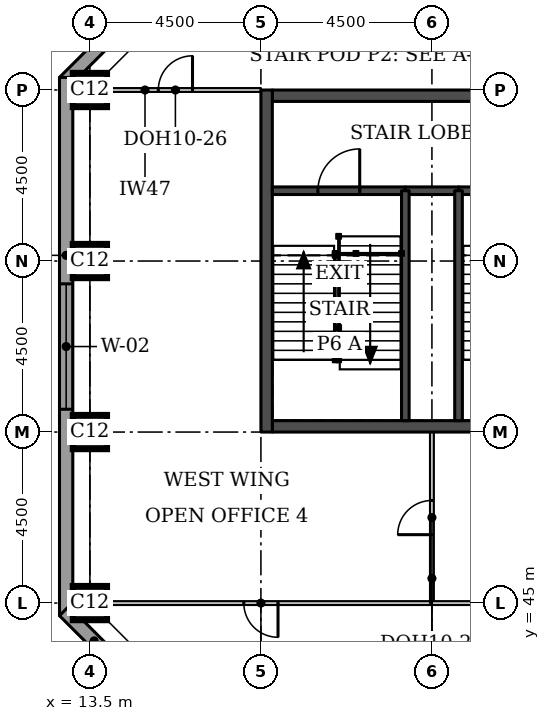
"""IFC4 building model, lengths in metres.
Left out: names, types, materials, properties, quantities, classifications, styles, units other than length and angle.
Written with IfcOpenShell. Run it as: python <this file> out.ifc"""

import sys

from ifc_helpers import new_model, si_unit, direction, frame, frame_2d, origin, origin_2d, place, context, subcontext, project, spatial, rectangle, extrude, element, fill, save


model = new_model("IFC4")
c1 = context("Model", 3, precision=1e-05, world=origin(), true_north=direction((0.0, 1.0)))
c2 = subcontext(c1, "Body", "Model", "MODEL_VIEW")
j1 = project(units=[si_unit("LENGTHUNIT", "METRE"), si_unit("PLANEANGLEUNIT", "RADIAN")], contexts=[c1])
p1 = place(None, origin())
s1 = spatial("IfcSite", under=j1, at=p1, CompositionType="ELEMENT")
p2 = place(p1, origin())
s2 = spatial("IfcBuilding", under=s1, at=p2, CompositionType="ELEMENT")
p3 = place(p2, frame((0.0, 0.0, 223.0)))
s3 = spatial("IfcBuildingStorey", under=s2, at=p3, CompositionType="ELEMENT", Elevation=223.0)
for number, where, z_axis, x_axis in (
    (1, (13.5, 45.0, 0.0), (0.0, 0.0, 1.0), (1.0, 0.0, 0.0)),
    (2, (13.5, 49.5, 0.0), (0.0, 0.0, 1.0), (1.0, 0.0, 0.0)),
    (3, (13.5, 54.0, 0.0), (0.0, 0.0, 1.0), (1.0, 0.0, 0.0)),
    (4, (13.5, 58.5, 0.0), (0.0, 0.0, 1.0), (1.0, 0.0, 0.0)),
):
    element("IfcColumn", number, at=place(p3, frame(where, z_axis=z_axis, x_axis=x_axis)), inside=s3, PredefinedType="COLUMN", context=c2, shape_type="SweptSolid", body=[
        extrude(rectangle(XDim=0.9, YDim=0.9, at=origin_2d()), origin(), (0.0, 0.0, 1.0), 3.7),
    ])
for number, where, z_axis, x_axis in (
    (5, (18.3, 49.65, 0.0), (0.0, 0.0, 1.0), (1.0, 0.0, 0.0)),
    (6, (18.3, 58.35, 0.0), (0.0, 0.0, 1.0), (1.0, 0.0, 0.0)),
):
    element("IfcWall", number, at=place(p3, frame(where, z_axis=z_axis, x_axis=x_axis)), inside=s3, PredefinedType="SHEAR", context=c2, shape_type="SweptSolid", body=[
        extrude(rectangle(XDim=8.4, YDim=0.3, at=frame_2d((4.2, 0.0))), origin(), (0.0, 0.0, 1.0), 3.7),
    ])
p4 = place(p3, frame((18.15, 49.5, 0.0), z_axis=(0.0, 0.0, 1.0), x_axis=(0.0, 1.0, 0.0)))
e7 = element("IfcWall", 7, at=p4, inside=s3, PredefinedType="SHEAR", context=c2, shape_type="SweptSolid", body=[
    extrude(rectangle(XDim=9.0, YDim=0.3, at=frame_2d((4.5, 0.0))), origin(), (0.0, 0.0, 1.0), 3.7),
])
p5 = place(p3, frame((17.792, 63.676, 0.0), z_axis=(0.0, 0.0, 1.0), x_axis=(-0.707106781187, -0.707106781187, 0.0)))
e8 = element("IfcWall", 8, at=p5, inside=s3, PredefinedType="STANDARD", context=c2, shape_type="SweptSolid", body=[
    extrude(rectangle(XDim=7.027, YDim=0.35, at=frame_2d((3.513, 0.0))), origin(), (0.0, 0.0, 1.0), 3.525),
])
p6 = place(p5, frame((1.863, 0.0, 0.9)))
e9 = element("IfcOpeningElement", 9, at=p6, cuts=e8, PredefinedType="OPENING", context=c2, shape_type="SweptSolid", body=[
    extrude(rectangle(XDim=3.3, YDim=1.9, at=frame_2d((1.65, 0.95))), frame((0.0, 0.185, 0.0), z_axis=(0.0, -1.0, 0.0), x_axis=(1.0, 0.0, 0.0)), (0.0, 0.0, 1.0), 0.37),
])
p7 = place(p3, frame((12.875, 58.831, 0.0), z_axis=(0.0, 0.0, 1.0), x_axis=(0.0, -1.0, 0.0)))
e10 = element("IfcWall", 10, at=p7, inside=s3, PredefinedType="STANDARD", context=c2, shape_type="SweptSolid", body=[
    extrude(rectangle(XDim=14.163, YDim=0.35, at=frame_2d((7.081, 0.0))), origin(), (0.0, 0.0, 1.0), 3.525),
])
p8 = place(p7, frame((5.431, 0.0, 0.9)))
e11 = element("IfcOpeningElement", 11, at=p8, cuts=e10, PredefinedType="OPENING", context=c2, shape_type="SweptSolid", body=[
    extrude(rectangle(XDim=3.3, YDim=1.9, at=frame_2d((1.65, 0.95))), frame((0.0, 0.185, 0.0), z_axis=(0.0, -1.0, 0.0), x_axis=(1.0, 0.0, 0.0)), (0.0, 0.0, 1.0), 0.37),
])
p9 = place(p3, frame((12.824, 44.792, 0.0), z_axis=(0.0, 0.0, 1.0), x_axis=(0.707106781187, -0.707106781187, 0.0)))
e12 = element("IfcWall", 12, at=p9, inside=s3, PredefinedType="STANDARD", context=c2, shape_type="SweptSolid", body=[
    extrude(rectangle(XDim=7.027, YDim=0.35, at=frame_2d((3.513, 0.0))), origin(), (0.0, 0.0, 1.0), 3.525),
])
p10 = place(p9, frame((1.863, 0.0, 0.9)))
e13 = element("IfcOpeningElement", 13, at=p10, cuts=e12, PredefinedType="OPENING", context=c2, shape_type="SweptSolid", body=[
    extrude(rectangle(XDim=3.3, YDim=1.9, at=frame_2d((1.65, 0.95))), frame((0.0, 0.185, 0.0), z_axis=(0.0, -1.0, 0.0), x_axis=(1.0, 0.0, 0.0)), (0.0, 0.0, 1.0), 0.37),
])
p11 = place(p3, frame((13.5, 58.5, 0.0), z_axis=(0.0, 0.0, 1.0), x_axis=(1.0, 0.0, 0.0)))
e14 = element("IfcWall", 14, at=p11, inside=s3, PredefinedType="PARTITIONING", context=c2, shape_type="SweptSolid", body=[
    extrude(rectangle(XDim=4.5, YDim=0.1, at=frame_2d((2.25, 0.0))), origin(), (0.0, 0.0, 1.0), 2.55),
])
p12 = place(p11, frame((1.8, 0.0, 0.0)))
e15 = element("IfcOpeningElement", 15, at=p12, cuts=e14, PredefinedType="OPENING", context=c2, shape_type="SweptSolid", body=[
    extrude(rectangle(XDim=0.9, YDim=2.1, at=frame_2d((0.45, 1.05))), frame((0.0, 0.06, 0.0), z_axis=(0.0, -1.0, 0.0), x_axis=(1.0, 0.0, 0.0)), (0.0, 0.0, 1.0), 0.12),
])
p13 = place(p3, frame((22.5, 45.0, 0.0), z_axis=(0.0, 0.0, 1.0), x_axis=(-1.0, 0.0, 0.0)))
e16 = element("IfcWall", 16, at=p13, inside=s3, PredefinedType="PARTITIONING", context=c2, shape_type="SweptSolid", body=[
    extrude(rectangle(XDim=9.0, YDim=0.1, at=frame_2d((4.5, 0.0))), origin(), (0.0, 0.0, 1.0), 2.55),
])
p14 = place(p13, frame((4.05, 0.0, 0.0)))
e17 = element("IfcOpeningElement", 17, at=p14, cuts=e16, PredefinedType="OPENING", context=c2, shape_type="SweptSolid", body=[
    extrude(rectangle(XDim=0.9, YDim=2.1, at=frame_2d((0.45, 1.05))), frame((0.0, 0.06, 0.0), z_axis=(0.0, -1.0, 0.0), x_axis=(1.0, 0.0, 0.0)), (0.0, 0.0, 1.0), 0.12),
])
p15 = place(p3, frame((22.5, 49.5, 0.0), z_axis=(0.0, 0.0, 1.0), x_axis=(0.0, -1.0, 0.0)))
e18 = element("IfcWall", 18, at=p15, inside=s3, PredefinedType="PARTITIONING", context=c2, shape_type="SweptSolid", body=[
    extrude(rectangle(XDim=4.5, YDim=0.1, at=frame_2d((2.25, 0.0))), origin(), (0.0, 0.0, 1.0), 3.55),
])
p16 = place(p15, frame((1.8, 0.0, 0.0)))
e19 = element("IfcOpeningElement", 19, at=p16, cuts=e18, PredefinedType="OPENING", context=c2, shape_type="SweptSolid", body=[
    extrude(rectangle(XDim=0.9, YDim=2.1, at=frame_2d((0.45, 1.05))), frame((0.0, 0.06, 0.0), z_axis=(0.0, -1.0, 0.0), x_axis=(1.0, 0.0, 0.0)), (0.0, 0.0, 1.0), 0.12),
])
p17 = place(p3, frame((22.5, 45.0, 0.0), z_axis=(0.0, 0.0, 1.0), x_axis=(1.0, 0.0, 0.0)))
e20 = element("IfcWall", 20, at=p17, inside=s3, PredefinedType="PARTITIONING", context=c2, shape_type="SweptSolid", body=[
    extrude(rectangle(XDim=4.5, YDim=0.1, at=frame_2d((2.25, 0.0))), origin(), (0.0, 0.0, 1.0), 2.55),
])
p18 = place(p3, frame((21.8, 55.85, 0.0), z_axis=(0.0, 0.0, 1.0), x_axis=(1.0, 0.0, 0.0)))
e21 = element("IfcWall", 21, at=p18, inside=s3, PredefinedType="SOLIDWALL", context=c2, shape_type="SweptSolid", body=[
    extrude(rectangle(XDim=1.4, YDim=0.2, at=frame_2d((0.7, 0.0))), origin(), (0.0, 0.0, 1.0), 3.55),
])
p19 = place(p3, frame((18.3, 55.85, 0.0), z_axis=(0.0, 0.0, 1.0), x_axis=(1.0, 0.0, 0.0)))
e22 = element("IfcWall", 22, at=p19, inside=s3, PredefinedType="SOLIDWALL", context=c2, shape_type="SweptSolid", body=[
    extrude(rectangle(XDim=3.5, YDim=0.2, at=frame_2d((1.75, 0.0))), origin(), (0.0, 0.0, 1.0), 3.55),
])
p20 = place(p19, frame((1.2, 0.0, 0.0)))
e23 = element("IfcOpeningElement", 23, at=p20, cuts=e22, PredefinedType="OPENING", context=c2, shape_type="SweptSolid", body=[
    extrude(rectangle(XDim=1.1, YDim=2.1, at=frame_2d((0.55, 1.05))), frame((0.0, 0.11, 0.0), z_axis=(0.0, -1.0, 0.0), x_axis=(1.0, 0.0, 0.0)), (0.0, 0.0, 1.0), 0.22),
])
p21 = place(p3, frame((23.2, 55.85, 0.0), z_axis=(0.0, 0.0, 1.0), x_axis=(1.0, 0.0, 0.0)))
e24 = element("IfcWall", 24, at=p21, inside=s3, PredefinedType="SOLIDWALL", context=c2, shape_type="SweptSolid", body=[
    extrude(rectangle(XDim=3.5, YDim=0.2, at=frame_2d((1.75, 0.0))), origin(), (0.0, 0.0, 1.0), 3.55),
])
p22 = place(p21, frame((1.2, 0.0, 0.0)))
e25 = element("IfcOpeningElement", 25, at=p22, cuts=e24, PredefinedType="OPENING", context=c2, shape_type="SweptSolid", body=[
    extrude(rectangle(XDim=1.1, YDim=2.1, at=frame_2d((0.55, 1.05))), frame((0.0, 0.11, 0.0), z_axis=(0.0, -1.0, 0.0), x_axis=(1.0, 0.0, 0.0)), (0.0, 0.0, 1.0), 0.22),
])
for number, where, z_axis, x_axis in (
    (26, (21.8, 49.8, 0.0), (0.0, 0.0, 1.0), (0.0, 1.0, 0.0)),
    (27, (23.2, 49.8, 0.0), (0.0, 0.0, 1.0), (0.0, 1.0, 0.0)),
):
    element("IfcWall", number, at=place(p3, frame(where, z_axis=z_axis, x_axis=x_axis)), inside=s3, PredefinedType="SOLIDWALL", context=c2, shape_type="SweptSolid", body=[
        extrude(rectangle(XDim=6.05, YDim=0.2, at=frame_2d((3.025, 0.0))), origin(), (0.0, 0.0, 1.0), 3.55),
    ])
p23 = place(p8, origin())
e28 = element("IfcWindow", 28, at=p23, inside=s3, PartitioningType="SINGLE_PANEL", PredefinedType="WINDOW", context=c2, shape_type="SweptSolid", body=[
    extrude(rectangle(XDim=3.3, YDim=1.9, at=frame_2d((1.65, 0.95))), frame((0.0, 0.085, 0.0), z_axis=(0.0, -1.0, 0.0), x_axis=(1.0, 0.0, 0.0)), (0.0, 0.0, 1.0), 0.06),
])
fill(e11, e28)
p24 = place(p12, origin())
e29 = element("IfcDoor", 29, at=p24, inside=s3, OperationType="SINGLE_SWING_RIGHT", PredefinedType="DOOR", context=c2, shape_type="SweptSolid", body=[
    extrude(rectangle(XDim=0.9, YDim=2.1, at=frame_2d((0.45, 1.05))), frame((0.0, 0.025, 0.0), z_axis=(0.0, -1.0, 0.0), x_axis=(1.0, 0.0, 0.0)), (0.0, 0.0, 1.0), 0.05),
])
fill(e15, e29)
p25 = place(p14, origin())
e30 = element("IfcDoor", 30, at=p25, inside=s3, OperationType="SINGLE_SWING_LEFT", PredefinedType="DOOR", context=c2, shape_type="SweptSolid", body=[
    extrude(rectangle(XDim=0.9, YDim=2.1, at=frame_2d((0.45, 1.05))), frame((0.0, 0.025, 0.0), z_axis=(0.0, -1.0, 0.0), x_axis=(1.0, 0.0, 0.0)), (0.0, 0.0, 1.0), 0.05),
])
fill(e17, e30)
p26 = place(p16, frame((0.9, 0.0, 0.0), z_axis=(0.0, 0.0, 1.0), x_axis=(-1.0, 0.0, 0.0)))
e31 = element("IfcDoor", 31, at=p26, inside=s3, OperationType="SINGLE_SWING_LEFT", PredefinedType="DOOR", context=c2, shape_type="SweptSolid", body=[
    extrude(rectangle(XDim=0.9, YDim=2.1, at=frame_2d((0.45, 1.05))), frame((0.0, 0.025, 0.0), z_axis=(0.0, -1.0, 0.0), x_axis=(1.0, 0.0, 0.0)), (0.0, 0.0, 1.0), 0.05),
])
fill(e19, e31)
p27 = place(p20, origin())
e32 = element("IfcDoor", 32, at=p27, inside=s3, OperationType="SINGLE_SWING_RIGHT", PredefinedType="DOOR", context=c2, shape_type="SweptSolid", body=[
    extrude(rectangle(XDim=1.1, YDim=2.1, at=frame_2d((0.55, 1.05))), frame((0.0, 0.025, 0.0), z_axis=(0.0, -1.0, 0.0), x_axis=(1.0, 0.0, 0.0)), (0.0, 0.0, 1.0), 0.05),
])
fill(e23, e32)
save(model, sys.argv[1])
